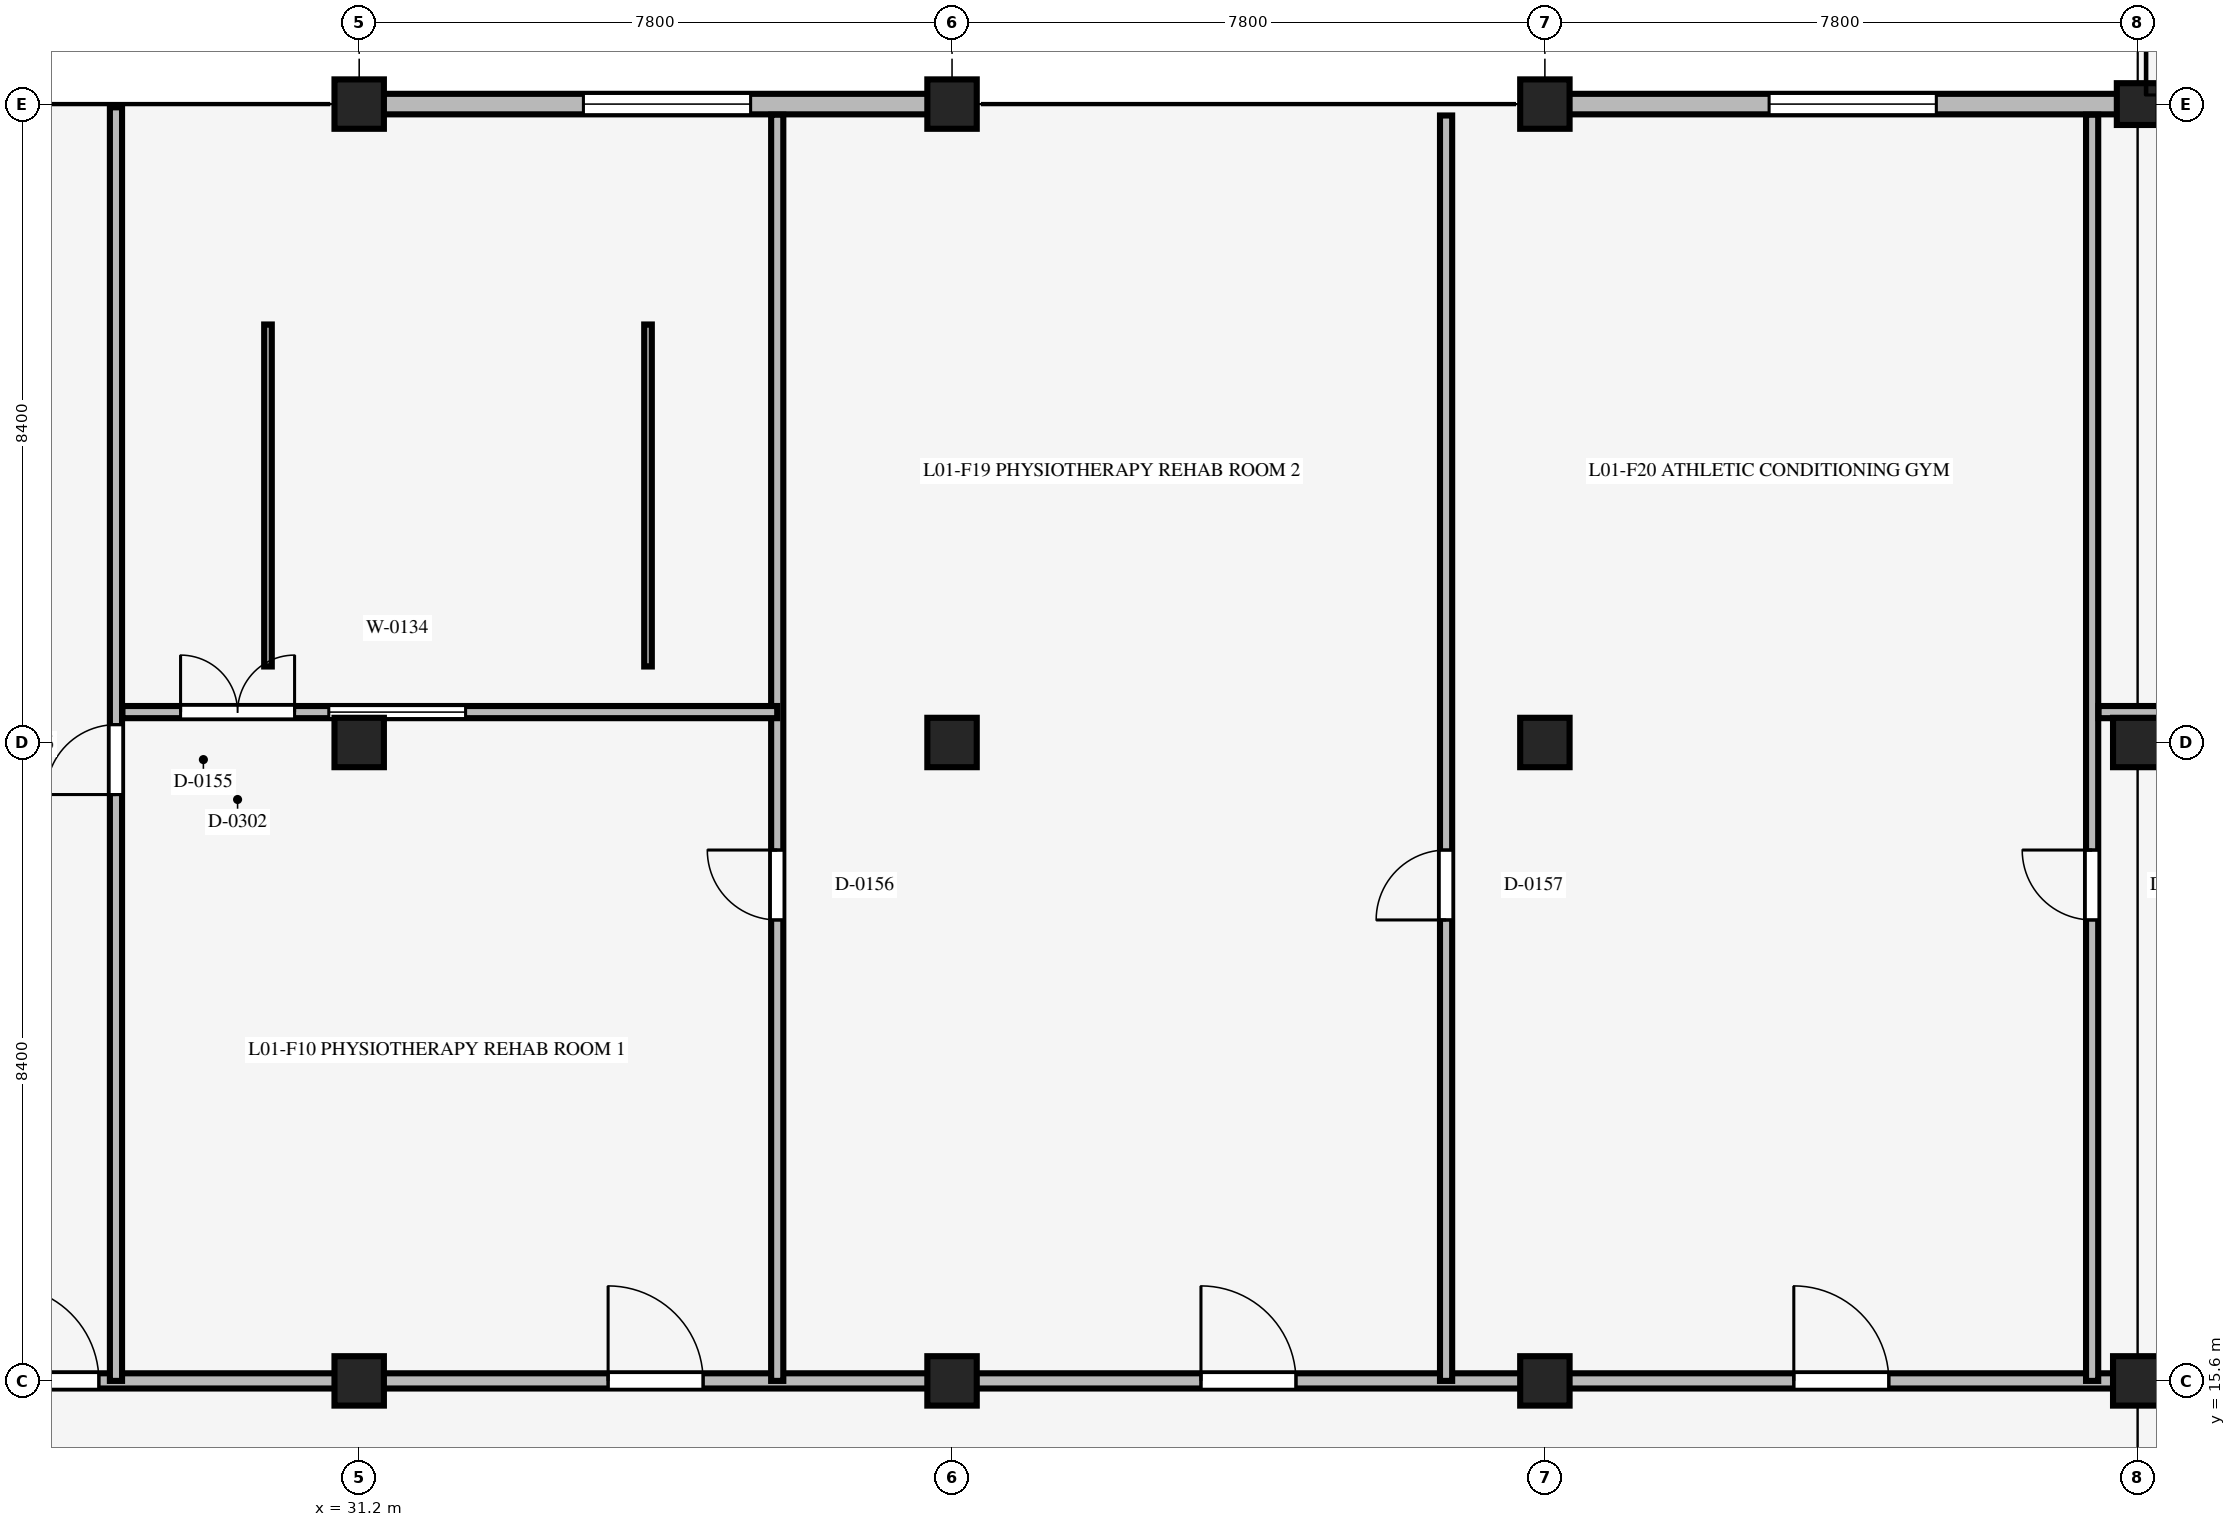
"""IFC4 building model, lengths in metres.
Left out: names, types, materials, properties, quantities, classifications, styles, units other than length and angle.
Written with IfcOpenShell. Run it as: python <this file> out.ifc"""

import sys

from ifc_helpers import new_model, si_unit, direction, frame, frame_2d, origin, origin_2d, place, context, subcontext, project, spatial, rectangle, extrude, element, fill, save


model = new_model("IFC4")
c1 = context("Model", 3, precision=1e-05, world=origin(), true_north=direction((0.0, 1.0)))
c2 = subcontext(c1, "Body", "Model", "MODEL_VIEW")
j1 = project(units=[si_unit("LENGTHUNIT", "METRE"), si_unit("PLANEANGLEUNIT", "RADIAN")], contexts=[c1])
p1 = place(None, origin())
s1 = spatial("IfcSite", under=j1, at=p1, CompositionType="ELEMENT")
p2 = place(p1, origin())
s2 = spatial("IfcBuilding", under=s1, at=p2, CompositionType="ELEMENT")
p3 = place(p2, frame((0.0, 0.0, 6.0)))
s3 = spatial("IfcBuildingStorey", under=s2, at=p3, CompositionType="ELEMENT", Elevation=6.0)
p4 = place(p3, frame((54.6, 32.4, 0.0), z_axis=(0.0, 0.0, 1.0), x_axis=(1.0, 0.0, 0.0)))
e1 = element("IfcColumn", 1, at=p4, inside=s3, PredefinedType="COLUMN", context=c2, shape_type="SweptSolid", body=[
    extrude(rectangle(XDim=0.55, YDim=0.55, at=origin_2d()), origin(), (0.0, 0.0, 1.0), 6.0),
])
for number, where, z_axis, x_axis in (
    (2, (31.2, 15.6, 0.0), (0.0, 0.0, 1.0), (1.0, 0.0, 0.0)),
    (3, (31.2, 24.0, 0.0), (0.0, 0.0, 1.0), (1.0, 0.0, 0.0)),
    (4, (31.2, 32.4, 0.0), (0.0, 0.0, 1.0), (1.0, 0.0, 0.0)),
    (5, (39.0, 15.6, 0.0), (0.0, 0.0, 1.0), (1.0, 0.0, 0.0)),
    (6, (39.0, 24.0, 0.0), (0.0, 0.0, 1.0), (1.0, 0.0, 0.0)),
    (7, (39.0, 32.4, 0.0), (0.0, 0.0, 1.0), (1.0, 0.0, 0.0)),
    (8, (46.8, 15.6, 0.0), (0.0, 0.0, 1.0), (1.0, 0.0, 0.0)),
    (9, (46.8, 24.0, 0.0), (0.0, 0.0, 1.0), (1.0, 0.0, 0.0)),
    (10, (46.8, 32.4, 0.0), (0.0, 0.0, 1.0), (1.0, 0.0, 0.0)),
    (11, (54.6, 15.6, 0.0), (0.0, 0.0, 1.0), (1.0, 0.0, 0.0)),
    (12, (54.6, 24.0, 0.0), (0.0, 0.0, 1.0), (1.0, 0.0, 0.0)),
):
    element("IfcColumn", number, at=place(p3, frame(where, z_axis=z_axis, x_axis=x_axis)), inside=s3, PredefinedType="COLUMN", context=c2, shape_type="SweptSolid", body=[
        extrude(rectangle(XDim=0.65, YDim=0.65, at=origin_2d()), origin(), (0.0, 0.0, 1.0), 6.0),
    ])
p5 = place(p3, frame((31.515, 32.4, 0.0), z_axis=(0.0, 0.0, 1.0), x_axis=(1.0, 0.0, 0.0)))
e13 = element("IfcWall", 13, at=p5, inside=s3, PredefinedType="STANDARD", context=c2, shape_type="SweptSolid", body=[
    extrude(rectangle(XDim=7.17, YDim=0.27, at=frame_2d((3.585, 0.0))), origin(), (0.0, 0.0, 1.0), 5.371),
])
p6 = place(p5, frame((2.635, 0.0, 0.95)))
e14 = element("IfcOpeningElement", 14, at=p6, cuts=e13, PredefinedType="OPENING", context=c2, shape_type="SweptSolid", body=[
    extrude(rectangle(XDim=2.2, YDim=1.9, at=frame_2d((1.1, 0.95))), frame((0.0, 0.145, 0.0), z_axis=(0.0, -1.0, 0.0), x_axis=(1.0, 0.0, 0.0)), (0.0, 0.0, 1.0), 0.29),
])
p7 = place(p3, frame((47.115, 32.4, 0.0), z_axis=(0.0, 0.0, 1.0), x_axis=(1.0, 0.0, 0.0)))
e15 = element("IfcWall", 15, at=p7, inside=s3, PredefinedType="STANDARD", context=c2, shape_type="SweptSolid", body=[
    extrude(rectangle(XDim=7.22, YDim=0.27, at=frame_2d((3.61, 0.0))), origin(), (0.0, 0.0, 1.0), 5.371),
])
p8 = place(p7, frame((2.635, 0.0, 0.95)))
e16 = element("IfcOpeningElement", 16, at=p8, cuts=e15, PredefinedType="OPENING", context=c2, shape_type="SweptSolid", body=[
    extrude(rectangle(XDim=2.2, YDim=1.9, at=frame_2d((1.1, 0.95))), frame((0.0, 0.145, 0.0), z_axis=(0.0, -1.0, 0.0), x_axis=(1.0, 0.0, 0.0)), (0.0, 0.0, 1.0), 0.29),
])
p9 = place(p3, frame((23.7, 15.6, 0.0), z_axis=(0.0, 0.0, 1.0), x_axis=(1.0, 0.0, 0.0)))
e17 = element("IfcWall", 17, at=p9, inside=s3, PredefinedType="STANDARD", context=c2, shape_type="SweptSolid", body=[
    extrude(rectangle(XDim=7.2, YDim=0.2, at=frame_2d((3.6, 0.0))), origin(), (0.0, 0.0, 1.0), 3.15),
])
p10 = place(p9, frame((2.825, 0.0, 0.0)))
e18 = element("IfcOpeningElement", 18, at=p10, cuts=e17, PredefinedType="OPENING", context=c2, shape_type="SweptSolid", body=[
    extrude(rectangle(XDim=1.25, YDim=2.2, at=frame_2d((0.625, 1.1))), frame((0.0, 0.11, 0.0), z_axis=(0.0, -1.0, 0.0), x_axis=(1.0, 0.0, 0.0)), (0.0, 0.0, 1.0), 0.22),
])
p11 = place(p3, frame((31.5, 15.6, 0.0), z_axis=(0.0, 0.0, 1.0), x_axis=(1.0, 0.0, 0.0)))
e19 = element("IfcWall", 19, at=p11, inside=s3, PredefinedType="STANDARD", context=c2, shape_type="SweptSolid", body=[
    extrude(rectangle(XDim=7.2, YDim=0.2, at=frame_2d((3.6, 0.0))), origin(), (0.0, 0.0, 1.0), 3.15),
])
p12 = place(p11, frame((2.975, 0.0, 0.0)))
e20 = element("IfcOpeningElement", 20, at=p12, cuts=e19, PredefinedType="OPENING", context=c2, shape_type="SweptSolid", body=[
    extrude(rectangle(XDim=1.25, YDim=2.2, at=frame_2d((0.625, 1.1))), frame((0.0, 0.11, 0.0), z_axis=(0.0, -1.0, 0.0), x_axis=(1.0, 0.0, 0.0)), (0.0, 0.0, 1.0), 0.22),
])
p13 = place(p3, frame((39.3, 15.6, 0.0), z_axis=(0.0, 0.0, 1.0), x_axis=(1.0, 0.0, 0.0)))
e21 = element("IfcWall", 21, at=p13, inside=s3, PredefinedType="STANDARD", context=c2, shape_type="SweptSolid", body=[
    extrude(rectangle(XDim=7.2, YDim=0.2, at=frame_2d((3.6, 0.0))), origin(), (0.0, 0.0, 1.0), 3.15),
])
p14 = place(p13, frame((2.975, 0.0, 0.0)))
e22 = element("IfcOpeningElement", 22, at=p14, cuts=e21, PredefinedType="OPENING", context=c2, shape_type="SweptSolid", body=[
    extrude(rectangle(XDim=1.25, YDim=2.2, at=frame_2d((0.625, 1.1))), frame((0.0, 0.11, 0.0), z_axis=(0.0, -1.0, 0.0), x_axis=(1.0, 0.0, 0.0)), (0.0, 0.0, 1.0), 0.22),
])
p15 = place(p3, frame((47.1, 15.6, 0.0), z_axis=(0.0, 0.0, 1.0), x_axis=(1.0, 0.0, 0.0)))
e23 = element("IfcWall", 23, at=p15, inside=s3, PredefinedType="STANDARD", context=c2, shape_type="SweptSolid", body=[
    extrude(rectangle(XDim=7.2, YDim=0.2, at=frame_2d((3.6, 0.0))), origin(), (0.0, 0.0, 1.0), 3.15),
])
p16 = place(p15, frame((2.975, 0.0, 0.0)))
e24 = element("IfcOpeningElement", 24, at=p16, cuts=e23, PredefinedType="OPENING", context=c2, shape_type="SweptSolid", body=[
    extrude(rectangle(XDim=1.25, YDim=2.2, at=frame_2d((0.625, 1.1))), frame((0.0, 0.11, 0.0), z_axis=(0.0, -1.0, 0.0), x_axis=(1.0, 0.0, 0.0)), (0.0, 0.0, 1.0), 0.22),
])
p17 = place(p3, frame((28.0, 15.6, 0.0), z_axis=(0.0, 0.0, 1.0), x_axis=(0.0, 1.0, 0.0)))
e25 = element("IfcWall", 25, at=p17, inside=s3, PredefinedType="STANDARD", context=c2, shape_type="SweptSolid", body=[
    extrude(rectangle(XDim=16.757, YDim=0.16, at=frame_2d((8.379, 0.0))), origin(), (0.0, 0.0, 1.0), 3.15),
])
p18 = place(p17, frame((7.715, 0.0, 0.0)))
e26 = element("IfcOpeningElement", 26, at=p18, cuts=e25, PredefinedType="OPENING", context=c2, shape_type="SweptSolid", body=[
    extrude(rectangle(XDim=0.92, YDim=2.15, at=frame_2d((0.46, 1.075))), frame((0.0, 0.09, 0.0), z_axis=(0.0, -1.0, 0.0), x_axis=(1.0, 0.0, 0.0)), (0.0, 0.0, 1.0), 0.18),
])
p19 = place(p3, frame((36.7, 15.6, 0.0), z_axis=(0.0, 0.0, 1.0), x_axis=(0.0, 1.0, 0.0)))
e27 = element("IfcWall", 27, at=p19, inside=s3, PredefinedType="STANDARD", context=c2, shape_type="SweptSolid", body=[
    extrude(rectangle(XDim=16.66, YDim=0.16, at=frame_2d((8.33, 0.0))), origin(), (0.0, 0.0, 1.0), 3.15),
])
p20 = place(p19, frame((6.065, 0.0, 0.0)))
e28 = element("IfcOpeningElement", 28, at=p20, cuts=e27, PredefinedType="OPENING", context=c2, shape_type="SweptSolid", body=[
    extrude(rectangle(XDim=0.92, YDim=2.15, at=frame_2d((0.46, 1.075))), frame((0.0, 0.09, 0.0), z_axis=(0.0, -1.0, 0.0), x_axis=(1.0, 0.0, 0.0)), (0.0, 0.0, 1.0), 0.18),
])
p21 = place(p3, frame((45.5, 15.6, 0.0), z_axis=(0.0, 0.0, 1.0), x_axis=(0.0, 1.0, 0.0)))
e29 = element("IfcWall", 29, at=p21, inside=s3, PredefinedType="STANDARD", context=c2, shape_type="SweptSolid", body=[
    extrude(rectangle(XDim=16.65, YDim=0.16, at=frame_2d((8.325, 0.0))), origin(), (0.0, 0.0, 1.0), 3.15),
])
p22 = place(p21, frame((6.065, 0.0, 0.0)))
e30 = element("IfcOpeningElement", 30, at=p22, cuts=e29, PredefinedType="OPENING", context=c2, shape_type="SweptSolid", body=[
    extrude(rectangle(XDim=0.92, YDim=2.15, at=frame_2d((0.46, 1.075))), frame((0.0, 0.09, 0.0), z_axis=(0.0, -1.0, 0.0), x_axis=(1.0, 0.0, 0.0)), (0.0, 0.0, 1.0), 0.18),
])
p23 = place(p3, frame((54.0, 15.6, 0.0), z_axis=(0.0, 0.0, 1.0), x_axis=(0.0, 1.0, 0.0)))
e31 = element("IfcWall", 31, at=p23, inside=s3, PredefinedType="STANDARD", context=c2, shape_type="SweptSolid", body=[
    extrude(rectangle(XDim=16.66, YDim=0.16, at=frame_2d((8.33, 0.0))), origin(), (0.0, 0.0, 1.0), 3.15),
])
p24 = place(p23, frame((6.065, 0.0, 0.0)))
e32 = element("IfcOpeningElement", 32, at=p24, cuts=e31, PredefinedType="OPENING", context=c2, shape_type="SweptSolid", body=[
    extrude(rectangle(XDim=0.92, YDim=2.15, at=frame_2d((0.46, 1.075))), frame((0.0, 0.09, 0.0), z_axis=(0.0, -1.0, 0.0), x_axis=(1.0, 0.0, 0.0)), (0.0, 0.0, 1.0), 0.18),
])
for number, where, z_axis, x_axis in (
    (33, (30.0, 25.0, 0.0), (0.0, 0.0, 1.0), (0.0, 1.0, 0.0)),
    (34, (35.0, 25.0, 0.0), (0.0, 0.0, 1.0), (0.0, 1.0, 0.0)),
):
    element("IfcWall", number, at=place(p3, frame(where, z_axis=z_axis, x_axis=x_axis)), inside=s3, PredefinedType="STANDARD", context=c2, shape_type="SweptSolid", body=[
        extrude(rectangle(XDim=4.5, YDim=0.1, at=frame_2d((2.25, 0.0))), origin(), (0.0, 0.0, 1.0), 3.15),
    ])
p25 = place(p3, frame((28.085, 24.4, 0.0), z_axis=(0.0, 0.0, 1.0), x_axis=(1.0, 0.0, 0.0)))
e35 = element("IfcWall", 35, at=p25, inside=s3, PredefinedType="STANDARD", context=c2, shape_type="SweptSolid", body=[
    extrude(rectangle(XDim=8.615, YDim=0.16, at=frame_2d((4.308, 0.0))), origin(), (0.0, 0.0, 1.0), 3.15),
])
p26 = place(p25, frame((0.765, 0.0, 0.0)))
e36 = element("IfcOpeningElement", 36, at=p26, cuts=e35, PredefinedType="OPENING", context=c2, shape_type="SweptSolid", body=[
    extrude(rectangle(XDim=1.5, YDim=2.2, at=frame_2d((0.75, 1.1))), frame((0.0, 0.09, 0.0), z_axis=(0.0, -1.0, 0.0), x_axis=(1.0, 0.0, 0.0)), (0.0, 0.0, 1.0), 0.18),
])
p27 = place(p25, frame((2.715, 0.0, 0.9)))
e37 = element("IfcOpeningElement", 37, at=p27, cuts=e35, PredefinedType="OPENING", context=c2, shape_type="SweptSolid", body=[
    extrude(rectangle(XDim=1.8, YDim=1.8, at=frame_2d((0.9, 0.9))), frame((0.0, 0.09, 0.0), z_axis=(0.0, -1.0, 0.0), x_axis=(1.0, 0.0, 0.0)), (0.0, 0.0, 1.0), 0.18),
])
p28 = place(p3, frame((54.085, 24.4, 0.0), z_axis=(0.0, 0.0, 1.0), x_axis=(1.0, 0.0, 0.0)))
e38 = element("IfcWall", 38, at=p28, inside=s3, PredefinedType="STANDARD", context=c2, shape_type="SweptSolid", body=[
    extrude(rectangle(XDim=21.915, YDim=0.16, at=frame_2d((10.958, 0.0))), origin(), (0.0, 0.0, 1.0), 3.15),
])
p29 = place(p28, frame((11.04, 0.0, 0.0)))
e39 = element("IfcOpeningElement", 39, at=p29, cuts=e38, PredefinedType="OPENING", context=c2, shape_type="SweptSolid", body=[
    extrude(rectangle(XDim=1.35, YDim=2.2, at=frame_2d((0.675, 1.1))), frame((0.0, 0.09, 0.0), z_axis=(0.0, -1.0, 0.0), x_axis=(1.0, 0.0, 0.0)), (0.0, 0.0, 1.0), 0.18),
])
p30 = place(p6, origin())
e40 = element("IfcWindow", 40, at=p30, inside=s3, PartitioningType="SINGLE_PANEL", PredefinedType="WINDOW", context=c2, shape_type="SweptSolid", body=[
    extrude(rectangle(XDim=2.2, YDim=1.9, at=frame_2d((1.1, 0.95))), frame((0.0, 0.03, 0.0), z_axis=(0.0, -1.0, 0.0), x_axis=(1.0, 0.0, 0.0)), (0.0, 0.0, 1.0), 0.06),
])
fill(e14, e40)
p31 = place(p8, origin())
e41 = element("IfcWindow", 41, at=p31, inside=s3, PartitioningType="SINGLE_PANEL", PredefinedType="WINDOW", context=c2, shape_type="SweptSolid", body=[
    extrude(rectangle(XDim=2.2, YDim=1.9, at=frame_2d((1.1, 0.95))), frame((0.0, 0.03, 0.0), z_axis=(0.0, -1.0, 0.0), x_axis=(1.0, 0.0, 0.0)), (0.0, 0.0, 1.0), 0.06),
])
fill(e16, e41)
p32 = place(p10, origin())
e42 = element("IfcDoor", 42, at=p32, inside=s3, OperationType="SINGLE_SWING_LEFT", PredefinedType="DOOR", context=c2, shape_type="SweptSolid", body=[
    extrude(rectangle(XDim=1.25, YDim=2.2, at=frame_2d((0.625, 1.1))), frame((0.0, 0.025, 0.0), z_axis=(0.0, -1.0, 0.0), x_axis=(1.0, 0.0, 0.0)), (0.0, 0.0, 1.0), 0.05),
])
fill(e18, e42)
p33 = place(p12, origin())
e43 = element("IfcDoor", 43, at=p33, inside=s3, OperationType="SINGLE_SWING_LEFT", PredefinedType="DOOR", context=c2, shape_type="SweptSolid", body=[
    extrude(rectangle(XDim=1.25, YDim=2.2, at=frame_2d((0.625, 1.1))), frame((0.0, 0.025, 0.0), z_axis=(0.0, -1.0, 0.0), x_axis=(1.0, 0.0, 0.0)), (0.0, 0.0, 1.0), 0.05),
])
fill(e20, e43)
p34 = place(p14, origin())
e44 = element("IfcDoor", 44, at=p34, inside=s3, OperationType="SINGLE_SWING_LEFT", PredefinedType="DOOR", context=c2, shape_type="SweptSolid", body=[
    extrude(rectangle(XDim=1.25, YDim=2.2, at=frame_2d((0.625, 1.1))), frame((0.0, 0.025, 0.0), z_axis=(0.0, -1.0, 0.0), x_axis=(1.0, 0.0, 0.0)), (0.0, 0.0, 1.0), 0.05),
])
fill(e22, e44)
p35 = place(p16, origin())
e45 = element("IfcDoor", 45, at=p35, inside=s3, OperationType="SINGLE_SWING_LEFT", PredefinedType="DOOR", context=c2, shape_type="SweptSolid", body=[
    extrude(rectangle(XDim=1.25, YDim=2.2, at=frame_2d((0.625, 1.1))), frame((0.0, 0.025, 0.0), z_axis=(0.0, -1.0, 0.0), x_axis=(1.0, 0.0, 0.0)), (0.0, 0.0, 1.0), 0.05),
])
fill(e24, e45)
p36 = place(p18, origin())
e46 = element("IfcDoor", 46, at=p36, inside=s3, OperationType="SINGLE_SWING_LEFT", PredefinedType="DOOR", context=c2, shape_type="SweptSolid", body=[
    extrude(rectangle(XDim=0.92, YDim=2.15, at=frame_2d((0.46, 1.075))), frame((0.0, 0.025, 0.0), z_axis=(0.0, -1.0, 0.0), x_axis=(1.0, 0.0, 0.0)), (0.0, 0.0, 1.0), 0.05),
])
fill(e26, e46)
p37 = place(p20, origin())
e47 = element("IfcDoor", 47, at=p37, inside=s3, OperationType="SINGLE_SWING_RIGHT", PredefinedType="DOOR", context=c2, shape_type="SweptSolid", body=[
    extrude(rectangle(XDim=0.92, YDim=2.15, at=frame_2d((0.46, 1.075))), frame((0.0, 0.025, 0.0), z_axis=(0.0, -1.0, 0.0), x_axis=(1.0, 0.0, 0.0)), (0.0, 0.0, 1.0), 0.05),
])
fill(e28, e47)
p38 = place(p22, origin())
e48 = element("IfcDoor", 48, at=p38, inside=s3, OperationType="SINGLE_SWING_LEFT", PredefinedType="DOOR", context=c2, shape_type="SweptSolid", body=[
    extrude(rectangle(XDim=0.92, YDim=2.15, at=frame_2d((0.46, 1.075))), frame((0.0, 0.025, 0.0), z_axis=(0.0, -1.0, 0.0), x_axis=(1.0, 0.0, 0.0)), (0.0, 0.0, 1.0), 0.05),
])
fill(e30, e48)
p39 = place(p24, origin())
e49 = element("IfcDoor", 49, at=p39, inside=s3, OperationType="SINGLE_SWING_RIGHT", PredefinedType="DOOR", context=c2, shape_type="SweptSolid", body=[
    extrude(rectangle(XDim=0.92, YDim=2.15, at=frame_2d((0.46, 1.075))), frame((0.0, 0.025, 0.0), z_axis=(0.0, -1.0, 0.0), x_axis=(1.0, 0.0, 0.0)), (0.0, 0.0, 1.0), 0.05),
])
fill(e32, e49)
p40 = place(p26, origin())
e50 = element("IfcDoor", 50, at=p40, inside=s3, OperationType="DOUBLE_DOOR_SINGLE_SWING", PredefinedType="DOOR", context=c2, shape_type="SweptSolid", body=[
    extrude(rectangle(XDim=1.5, YDim=2.2, at=frame_2d((0.75, 1.1))), frame((0.0, 0.025, 0.0), z_axis=(0.0, -1.0, 0.0), x_axis=(1.0, 0.0, 0.0)), (0.0, 0.0, 1.0), 0.05),
])
fill(e36, e50)
p41 = place(p27, origin())
e51 = element("IfcWindow", 51, at=p41, inside=s3, PartitioningType="SINGLE_PANEL", PredefinedType="WINDOW", context=c2, shape_type="SweptSolid", body=[
    extrude(rectangle(XDim=1.8, YDim=1.8, at=frame_2d((0.9, 0.9))), frame((0.0, 0.03, 0.0), z_axis=(0.0, -1.0, 0.0), x_axis=(1.0, 0.0, 0.0)), (0.0, 0.0, 1.0), 0.06),
])
fill(e37, e51)
save(model, sys.argv[1])
